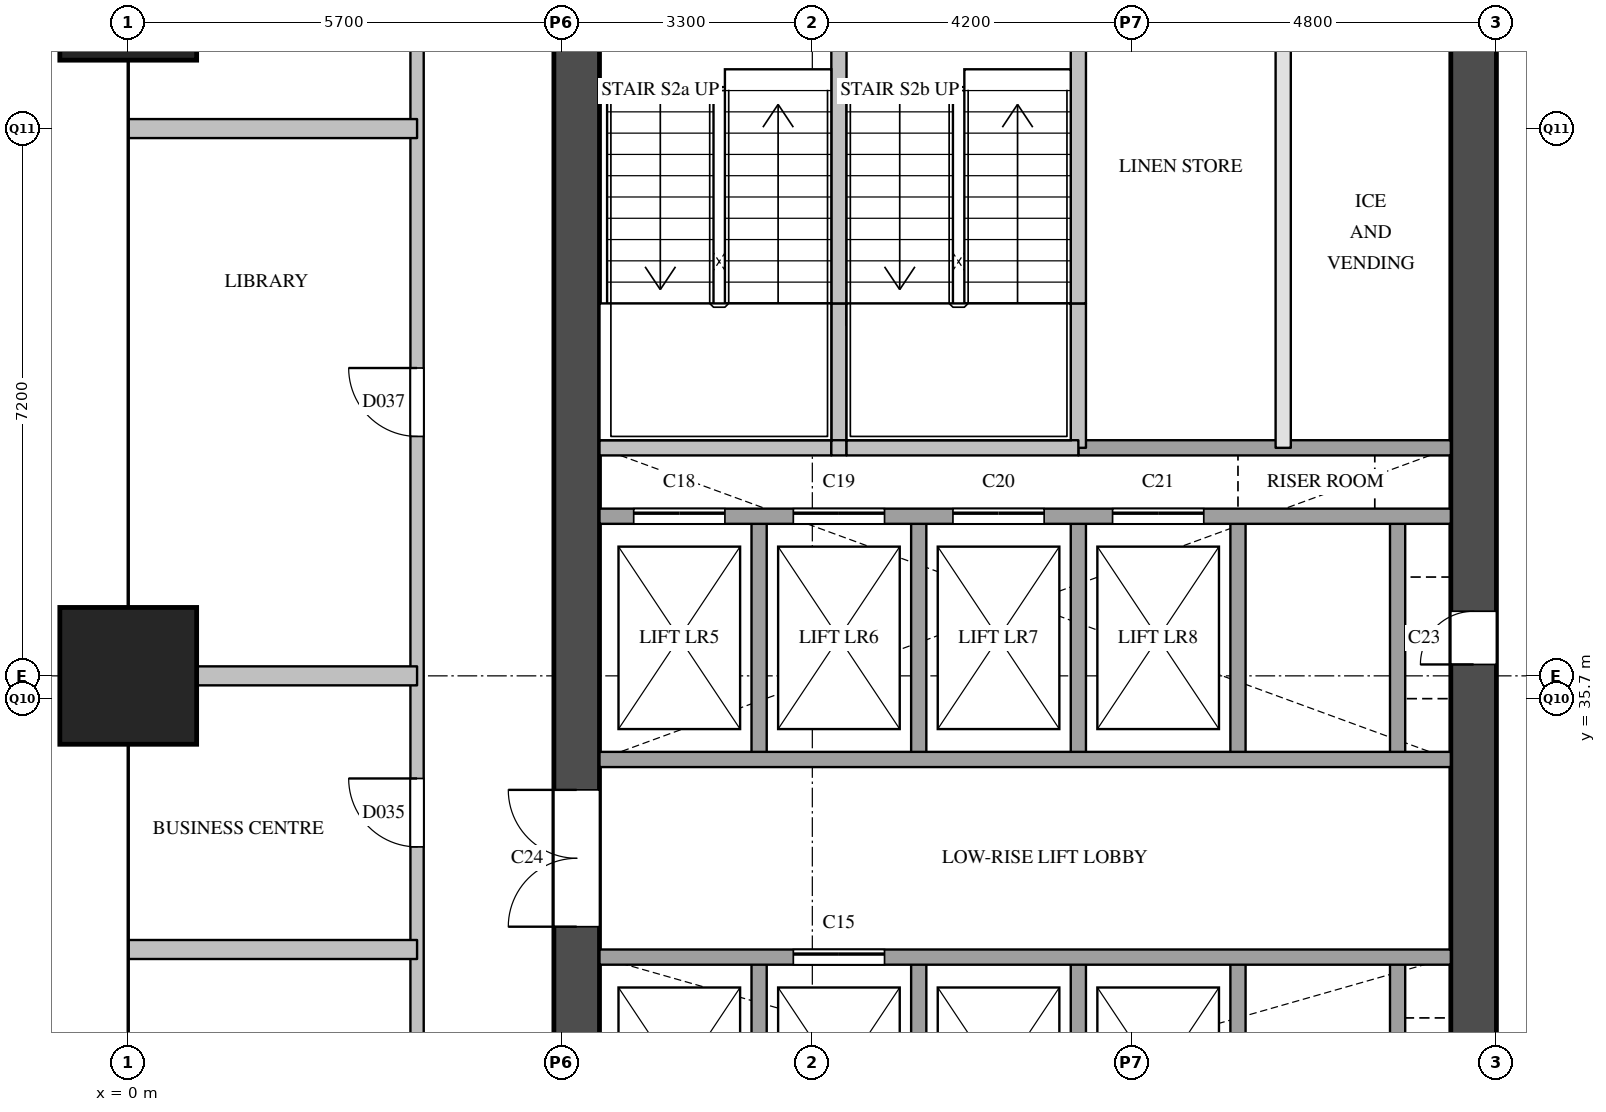
"""IFC4 building model, lengths in metres.
Left out: names, types, materials, properties, quantities, classifications, styles, units other than length and angle.
Written with IfcOpenShell. Run it as: python <this file> out.ifc"""

import sys

from ifc_helpers import new_model, si_unit, direction, frame, frame_2d, origin, origin_2d, place, context, subcontext, project, spatial, rectangle, extrude, element, fill, save


model = new_model("IFC4")
c1 = context("Model", 3, precision=1e-05, world=origin(), true_north=direction((0.0, 1.0)))
c2 = subcontext(c1, "Body", "Model", "MODEL_VIEW")
j1 = project(units=[si_unit("LENGTHUNIT", "METRE"), si_unit("PLANEANGLEUNIT", "RADIAN")], contexts=[c1])
p1 = place(None, origin())
s1 = spatial("IfcSite", under=j1, at=p1, CompositionType="ELEMENT")
p2 = place(p1, origin())
s2 = spatial("IfcBuilding", under=s1, at=p2, CompositionType="ELEMENT")
p3 = place(p2, frame((0.0, 0.0, 57.6)))
s3 = spatial("IfcBuildingStorey", under=s2, at=p3, CompositionType="ELEMENT", Elevation=57.6)
for number, where, z_axis, x_axis in (
    (1, (0.0, 36.0, 0.0), (0.0, 0.0, 1.0), (1.0, 0.0, 0.0)),
    (2, (0.0, 45.0, 0.0), (0.0, 0.0, 1.0), (1.0, 0.0, 0.0)),
):
    element("IfcColumn", number, at=place(p3, frame(where, z_axis=z_axis, x_axis=x_axis)), inside=s3, PredefinedType="COLUMN", context=c2, shape_type="SweptSolid", body=[
        extrude(rectangle(XDim=1.8, YDim=1.8, at=origin_2d()), origin(), (0.0, 0.0, 1.0), 3.8),
    ])
p4 = place(p3, frame((5.9, 29.1, 0.0), z_axis=(0.0, 0.0, 1.0), x_axis=(0.0, 1.0, 0.0)))
e3 = element("IfcWall", 3, at=p4, inside=s3, PredefinedType="SHEAR", context=c2, shape_type="SweptSolid", body=[
    extrude(rectangle(XDim=20.3, YDim=0.6, at=frame_2d((10.15, 0.0))), origin(), (0.0, 0.0, 1.0), 3.5),
])
p5 = place(p4, frame((3.6, 0.0, 0.0)))
e4 = element("IfcOpeningElement", 4, at=p5, cuts=e3, PredefinedType="OPENING", context=c2, shape_type="SweptSolid", body=[
    extrude(rectangle(XDim=1.8, YDim=2.1, at=frame_2d((0.9, 1.05))), frame((0.0, 0.31, 0.0), z_axis=(0.0, -1.0, 0.0), x_axis=(1.0, 0.0, 0.0)), (0.0, 0.0, 1.0), 0.62),
])
p6 = place(p4, frame((16.4, 0.0, 0.0)))
e5 = element("IfcOpeningElement", 5, at=p6, cuts=e3, PredefinedType="OPENING", context=c2, shape_type="SweptSolid", body=[
    extrude(rectangle(XDim=1.0, YDim=2.1, at=frame_2d((0.5, 1.05))), frame((0.0, 0.31, 0.0), z_axis=(0.0, -1.0, 0.0), x_axis=(1.0, 0.0, 0.0)), (0.0, 0.0, 1.0), 0.62),
])
p7 = place(p3, frame((17.7, 29.1, 0.0), z_axis=(0.0, 0.0, 1.0), x_axis=(0.0, 1.0, 0.0)))
e6 = element("IfcWall", 6, at=p7, inside=s3, PredefinedType="SHEAR", context=c2, shape_type="SweptSolid", body=[
    extrude(rectangle(XDim=20.3, YDim=0.6, at=frame_2d((10.15, 0.0))), origin(), (0.0, 0.0, 1.0), 3.5),
])
p8 = place(p7, frame((1.25, 0.0, 0.0)))
e7 = element("IfcOpeningElement", 7, at=p8, cuts=e6, PredefinedType="OPENING", context=c2, shape_type="SweptSolid", body=[
    extrude(rectangle(XDim=0.7, YDim=2.1, at=frame_2d((0.35, 1.05))), frame((0.0, 0.31, 0.0), z_axis=(0.0, -1.0, 0.0), x_axis=(1.0, 0.0, 0.0)), (0.0, 0.0, 1.0), 0.62),
])
p9 = place(p7, frame((7.05, 0.0, 0.0)))
e8 = element("IfcOpeningElement", 8, at=p9, cuts=e6, PredefinedType="OPENING", context=c2, shape_type="SweptSolid", body=[
    extrude(rectangle(XDim=0.7, YDim=2.1, at=frame_2d((0.35, 1.05))), frame((0.0, 0.31, 0.0), z_axis=(0.0, -1.0, 0.0), x_axis=(1.0, 0.0, 0.0)), (0.0, 0.0, 1.0), 0.62),
])
p10 = place(p3, frame((8.3, 29.1, 0.0), z_axis=(0.0, 0.0, 1.0), x_axis=(0.0, 1.0, 0.0)))
e9 = element("IfcWall", 9, at=p10, inside=s3, PredefinedType="SOLIDWALL", context=c2, shape_type="SweptSolid", body=[
    extrude(rectangle(XDim=3.2, YDim=0.2, at=frame_2d((1.6, 0.0))), origin(), (0.0, 0.0, 1.0), 3.5),
])
p11 = place(p3, frame((8.3, 34.9, 0.0), z_axis=(0.0, 0.0, 1.0), x_axis=(0.0, 1.0, 0.0)))
e10 = element("IfcWall", 10, at=p11, inside=s3, PredefinedType="SOLIDWALL", context=c2, shape_type="SweptSolid", body=[
    extrude(rectangle(XDim=3.2, YDim=0.2, at=frame_2d((1.6, 0.0))), origin(), (0.0, 0.0, 1.0), 3.5),
])
p12 = place(p3, frame((9.35, 39.0, 0.0), z_axis=(0.0, 0.0, 1.0), x_axis=(0.0, 1.0, 0.0)))
e11 = element("IfcWall", 11, at=p12, inside=s3, PredefinedType="SOLIDWALL", context=c2, shape_type="SweptSolid", body=[
    extrude(rectangle(XDim=1.9, YDim=0.2, at=frame_2d((0.95, 0.0))), origin(), (0.0, 0.0, 1.0), 3.5),
])
p13 = place(p3, frame((9.35, 40.9, 0.0), z_axis=(0.0, 0.0, 1.0), x_axis=(0.0, 1.0, 0.0)))
e12 = element("IfcWall", 12, at=p13, inside=s3, PredefinedType="SOLIDWALL", context=c2, shape_type="SweptSolid", body=[
    extrude(rectangle(XDim=4.3, YDim=0.2, at=frame_2d((2.15, 0.0))), origin(), (0.0, 0.0, 1.0), 3.5),
])
p14 = place(p3, frame((10.4, 29.1, 0.0), z_axis=(0.0, 0.0, 1.0), x_axis=(0.0, 1.0, 0.0)))
e13 = element("IfcWall", 13, at=p14, inside=s3, PredefinedType="SOLIDWALL", context=c2, shape_type="SweptSolid", body=[
    extrude(rectangle(XDim=3.2, YDim=0.2, at=frame_2d((1.6, 0.0))), origin(), (0.0, 0.0, 1.0), 3.5),
])
p15 = place(p3, frame((10.4, 34.9, 0.0), z_axis=(0.0, 0.0, 1.0), x_axis=(0.0, 1.0, 0.0)))
e14 = element("IfcWall", 14, at=p15, inside=s3, PredefinedType="SOLIDWALL", context=c2, shape_type="SweptSolid", body=[
    extrude(rectangle(XDim=3.2, YDim=0.2, at=frame_2d((1.6, 0.0))), origin(), (0.0, 0.0, 1.0), 3.5),
])
p16 = place(p3, frame((12.5, 29.1, 0.0), z_axis=(0.0, 0.0, 1.0), x_axis=(0.0, 1.0, 0.0)))
e15 = element("IfcWall", 15, at=p16, inside=s3, PredefinedType="SOLIDWALL", context=c2, shape_type="SweptSolid", body=[
    extrude(rectangle(XDim=3.2, YDim=0.2, at=frame_2d((1.6, 0.0))), origin(), (0.0, 0.0, 1.0), 3.5),
])
p17 = place(p3, frame((12.5, 34.9, 0.0), z_axis=(0.0, 0.0, 1.0), x_axis=(0.0, 1.0, 0.0)))
e16 = element("IfcWall", 16, at=p17, inside=s3, PredefinedType="SOLIDWALL", context=c2, shape_type="SweptSolid", body=[
    extrude(rectangle(XDim=3.2, YDim=0.2, at=frame_2d((1.6, 0.0))), origin(), (0.0, 0.0, 1.0), 3.5),
])
p18 = place(p3, frame((12.5, 39.0, 0.0), z_axis=(0.0, 0.0, 1.0), x_axis=(0.0, 1.0, 0.0)))
e17 = element("IfcWall", 17, at=p18, inside=s3, PredefinedType="SOLIDWALL", context=c2, shape_type="SweptSolid", body=[
    extrude(rectangle(XDim=1.9, YDim=0.2, at=frame_2d((0.95, 0.0))), origin(), (0.0, 0.0, 1.0), 3.5),
])
p19 = place(p3, frame((12.5, 40.9, 0.0), z_axis=(0.0, 0.0, 1.0), x_axis=(0.0, 1.0, 0.0)))
e18 = element("IfcWall", 18, at=p19, inside=s3, PredefinedType="SOLIDWALL", context=c2, shape_type="SweptSolid", body=[
    extrude(rectangle(XDim=4.3, YDim=0.2, at=frame_2d((2.15, 0.0))), origin(), (0.0, 0.0, 1.0), 3.5),
])
p20 = place(p3, frame((14.6, 29.1, 0.0), z_axis=(0.0, 0.0, 1.0), x_axis=(0.0, 1.0, 0.0)))
e19 = element("IfcWall", 19, at=p20, inside=s3, PredefinedType="SOLIDWALL", context=c2, shape_type="SweptSolid", body=[
    extrude(rectangle(XDim=3.2, YDim=0.2, at=frame_2d((1.6, 0.0))), origin(), (0.0, 0.0, 1.0), 3.5),
])
p21 = place(p3, frame((14.6, 34.9, 0.0), z_axis=(0.0, 0.0, 1.0), x_axis=(0.0, 1.0, 0.0)))
e20 = element("IfcWall", 20, at=p21, inside=s3, PredefinedType="SOLIDWALL", context=c2, shape_type="SweptSolid", body=[
    extrude(rectangle(XDim=3.2, YDim=0.2, at=frame_2d((1.6, 0.0))), origin(), (0.0, 0.0, 1.0), 3.5),
])
p22 = place(p3, frame((15.195, 39.0, 0.0), z_axis=(0.0, 0.0, 1.0), x_axis=(0.0, 1.0, 0.0)))
e21 = element("IfcWall", 21, at=p22, inside=s3, PredefinedType="PARTITIONING", context=c2, shape_type="SweptSolid", body=[
    extrude(rectangle(XDim=6.2, YDim=0.2, at=frame_2d((3.1, 0.0))), origin(), (0.0, 0.0, 1.0), 3.5),
])
p23 = place(p3, frame((16.7, 29.1, 0.0), z_axis=(0.0, 0.0, 1.0), x_axis=(0.0, 1.0, 0.0)))
e22 = element("IfcWall", 22, at=p23, inside=s3, PredefinedType="SOLIDWALL", context=c2, shape_type="SweptSolid", body=[
    extrude(rectangle(XDim=3.2, YDim=0.2, at=frame_2d((1.6, 0.0))), origin(), (0.0, 0.0, 1.0), 3.5),
])
p24 = place(p3, frame((16.7, 34.9, 0.0), z_axis=(0.0, 0.0, 1.0), x_axis=(0.0, 1.0, 0.0)))
e23 = element("IfcWall", 23, at=p24, inside=s3, PredefinedType="SOLIDWALL", context=c2, shape_type="SweptSolid", body=[
    extrude(rectangle(XDim=3.2, YDim=0.2, at=frame_2d((1.6, 0.0))), origin(), (0.0, 0.0, 1.0), 3.5),
])
p25 = place(p3, frame((6.2, 32.3, 0.0), z_axis=(0.0, 0.0, 1.0), x_axis=(1.0, 0.0, 0.0)))
e24 = element("IfcWall", 24, at=p25, inside=s3, PredefinedType="SOLIDWALL", context=c2, shape_type="SweptSolid", body=[
    extrude(rectangle(XDim=11.2, YDim=0.2, at=frame_2d((5.6, 0.0))), origin(), (0.0, 0.0, 1.0), 3.5),
])
p26 = place(p25, frame((2.55, 0.0, 0.0)))
e25 = element("IfcOpeningElement", 25, at=p26, cuts=e24, PredefinedType="OPENING", context=c2, shape_type="SweptSolid", body=[
    extrude(rectangle(XDim=1.2, YDim=2.1, at=frame_2d((0.6, 1.05))), frame((0.0, 0.11, 0.0), z_axis=(0.0, -1.0, 0.0), x_axis=(1.0, 0.0, 0.0)), (0.0, 0.0, 1.0), 0.22),
])
p27 = place(p3, frame((6.2, 34.9, 0.0), z_axis=(0.0, 0.0, 1.0), x_axis=(1.0, 0.0, 0.0)))
e26 = element("IfcWall", 26, at=p27, inside=s3, PredefinedType="SOLIDWALL", context=c2, shape_type="SweptSolid", body=[
    extrude(rectangle(XDim=11.2, YDim=0.2, at=frame_2d((5.6, 0.0))), origin(), (0.0, 0.0, 1.0), 3.5),
])
p28 = place(p3, frame((6.2, 38.1, 0.0), z_axis=(0.0, 0.0, 1.0), x_axis=(1.0, 0.0, 0.0)))
e27 = element("IfcWall", 27, at=p28, inside=s3, PredefinedType="SOLIDWALL", context=c2, shape_type="SweptSolid", body=[
    extrude(rectangle(XDim=11.2, YDim=0.2, at=frame_2d((5.6, 0.0))), origin(), (0.0, 0.0, 1.0), 3.5),
])
p29 = place(p28, frame((0.45, 0.0, 0.0)))
e28 = element("IfcOpeningElement", 28, at=p29, cuts=e27, PredefinedType="OPENING", context=c2, shape_type="SweptSolid", body=[
    extrude(rectangle(XDim=1.2, YDim=2.1, at=frame_2d((0.6, 1.05))), frame((0.0, 0.11, 0.0), z_axis=(0.0, -1.0, 0.0), x_axis=(1.0, 0.0, 0.0)), (0.0, 0.0, 1.0), 0.22),
])
p30 = place(p28, frame((2.55, 0.0, 0.0)))
e29 = element("IfcOpeningElement", 29, at=p30, cuts=e27, PredefinedType="OPENING", context=c2, shape_type="SweptSolid", body=[
    extrude(rectangle(XDim=1.2, YDim=2.1, at=frame_2d((0.6, 1.05))), frame((0.0, 0.11, 0.0), z_axis=(0.0, -1.0, 0.0), x_axis=(1.0, 0.0, 0.0)), (0.0, 0.0, 1.0), 0.22),
])
p31 = place(p28, frame((4.65, 0.0, 0.0)))
e30 = element("IfcOpeningElement", 30, at=p31, cuts=e27, PredefinedType="OPENING", context=c2, shape_type="SweptSolid", body=[
    extrude(rectangle(XDim=1.2, YDim=2.1, at=frame_2d((0.6, 1.05))), frame((0.0, 0.11, 0.0), z_axis=(0.0, -1.0, 0.0), x_axis=(1.0, 0.0, 0.0)), (0.0, 0.0, 1.0), 0.22),
])
p32 = place(p28, frame((6.75, 0.0, 0.0)))
e31 = element("IfcOpeningElement", 31, at=p32, cuts=e27, PredefinedType="OPENING", context=c2, shape_type="SweptSolid", body=[
    extrude(rectangle(XDim=1.2, YDim=2.1, at=frame_2d((0.6, 1.05))), frame((0.0, 0.11, 0.0), z_axis=(0.0, -1.0, 0.0), x_axis=(1.0, 0.0, 0.0)), (0.0, 0.0, 1.0), 0.22),
])
p33 = place(p3, frame((12.5, 39.0, 0.0), z_axis=(0.0, 0.0, 1.0), x_axis=(1.0, 0.0, 0.0)))
e32 = element("IfcWall", 32, at=p33, inside=s3, PredefinedType="SOLIDWALL", context=c2, shape_type="SweptSolid", body=[
    extrude(rectangle(XDim=4.9, YDim=0.2, at=frame_2d((2.45, 0.0))), origin(), (0.0, 0.0, 1.0), 3.5),
])
p34 = place(p3, frame((6.2, 39.0, 0.0), z_axis=(0.0, 0.0, 1.0), x_axis=(1.0, 0.0, 0.0)))
e33 = element("IfcWall", 33, at=p34, inside=s3, PredefinedType="SOLIDWALL", context=c2, shape_type="SweptSolid", body=[
    extrude(rectangle(XDim=3.05, YDim=0.2, at=frame_2d((1.525, 0.0))), origin(), (0.0, 0.0, 1.0), 3.5),
])
p35 = place(p3, frame((9.25, 39.0, 0.0), z_axis=(0.0, 0.0, 1.0), x_axis=(1.0, 0.0, 0.0)))
e34 = element("IfcWall", 34, at=p35, inside=s3, PredefinedType="SOLIDWALL", context=c2, shape_type="SweptSolid", body=[
    extrude(rectangle(XDim=0.2, YDim=0.2, at=frame_2d((0.1, 0.0))), origin(), (0.0, 0.0, 1.0), 3.5),
])
p36 = place(p3, frame((9.45, 39.0, 0.0), z_axis=(0.0, 0.0, 1.0), x_axis=(1.0, 0.0, 0.0)))
e35 = element("IfcWall", 35, at=p36, inside=s3, PredefinedType="SOLIDWALL", context=c2, shape_type="SweptSolid", body=[
    extrude(rectangle(XDim=3.05, YDim=0.2, at=frame_2d((1.525, 0.0))), origin(), (0.0, 0.0, 1.0), 3.5),
])
p37 = place(p3, frame((3.8, 26.7, 0.0), z_axis=(0.0, 0.0, 1.0), x_axis=(0.0, 1.0, 0.0)))
e36 = element("IfcWall", 36, at=p37, inside=s3, PredefinedType="PARTITIONING", context=c2, shape_type="SweptSolid", body=[
    extrude(rectangle(XDim=25.1, YDim=0.175, at=frame_2d((12.55, 0.0))), origin(), (0.0, 0.0, 1.0), 2.5),
])
p38 = place(p37, frame((2.4, 0.0, 0.0)))
e37 = element("IfcOpeningElement", 37, at=p38, cuts=e36, PredefinedType="OPENING", context=c2, shape_type="SweptSolid", body=[
    extrude(rectangle(XDim=0.9, YDim=2.1, at=frame_2d((0.45, 1.05))), frame((0.0, 0.097, 0.0), z_axis=(0.0, -1.0, 0.0), x_axis=(1.0, 0.0, 0.0)), (0.0, 0.0, 1.0), 0.195),
])
p39 = place(p37, frame((7.05, 0.0, 0.0)))
e38 = element("IfcOpeningElement", 38, at=p39, cuts=e36, PredefinedType="OPENING", context=c2, shape_type="SweptSolid", body=[
    extrude(rectangle(XDim=0.9, YDim=2.1, at=frame_2d((0.45, 1.05))), frame((0.0, 0.097, 0.0), z_axis=(0.0, -1.0, 0.0), x_axis=(1.0, 0.0, 0.0)), (0.0, 0.0, 1.0), 0.195),
])
p40 = place(p37, frame((12.45, 0.0, 0.0)))
e39 = element("IfcOpeningElement", 39, at=p40, cuts=e36, PredefinedType="OPENING", context=c2, shape_type="SweptSolid", body=[
    extrude(rectangle(XDim=0.9, YDim=2.1, at=frame_2d((0.45, 1.05))), frame((0.0, 0.097, 0.0), z_axis=(0.0, -1.0, 0.0), x_axis=(1.0, 0.0, 0.0)), (0.0, 0.0, 1.0), 0.195),
])
p41 = place(p37, frame((20.35, 0.0, 0.0)))
e40 = element("IfcOpeningElement", 40, at=p41, cuts=e36, PredefinedType="OPENING", context=c2, shape_type="SweptSolid", body=[
    extrude(rectangle(XDim=0.9, YDim=2.1, at=frame_2d((0.45, 1.05))), frame((0.0, 0.097, 0.0), z_axis=(0.0, -1.0, 0.0), x_axis=(1.0, 0.0, 0.0)), (0.0, 0.0, 1.0), 0.195),
])
p42 = place(p3, frame((0.0, 32.4, 0.0), z_axis=(0.0, 0.0, 1.0), x_axis=(1.0, 0.0, 0.0)))
e41 = element("IfcWall", 41, at=p42, inside=s3, PredefinedType="PARTITIONING", context=c2, shape_type="SweptSolid", body=[
    extrude(rectangle(XDim=3.8, YDim=0.25, at=frame_2d((1.9, 0.0))), origin(), (0.0, 0.0, 1.0), 2.5),
])
p43 = place(p3, frame((0.0, 36.0, 0.0), z_axis=(0.0, 0.0, 1.0), x_axis=(1.0, 0.0, 0.0)))
e42 = element("IfcWall", 42, at=p43, inside=s3, PredefinedType="PARTITIONING", context=c2, shape_type="SweptSolid", body=[
    extrude(rectangle(XDim=3.8, YDim=0.25, at=frame_2d((1.9, 0.0))), origin(), (0.0, 0.0, 1.0), 3.5),
])
p44 = place(p3, frame((0.0, 43.2, 0.0), z_axis=(0.0, 0.0, 1.0), x_axis=(1.0, 0.0, 0.0)))
e43 = element("IfcWall", 43, at=p44, inside=s3, PredefinedType="PARTITIONING", context=c2, shape_type="SweptSolid", body=[
    extrude(rectangle(XDim=3.8, YDim=0.25, at=frame_2d((1.9, 0.0))), origin(), (0.0, 0.0, 1.0), 2.5),
])
p45 = place(p26, origin())
e44 = element("IfcDoor", 44, at=p45, inside=s3, OperationType="SLIDING_TO_LEFT", PredefinedType="DOOR", context=c2, shape_type="SweptSolid", body=[
    extrude(rectangle(XDim=1.2, YDim=2.1, at=frame_2d((0.6, 1.05))), frame((0.0, 0.025, 0.0), z_axis=(0.0, -1.0, 0.0), x_axis=(1.0, 0.0, 0.0)), (0.0, 0.0, 1.0), 0.05),
])
fill(e25, e44)
p46 = place(p29, origin())
e45 = element("IfcDoor", 45, at=p46, inside=s3, OperationType="SLIDING_TO_LEFT", PredefinedType="DOOR", context=c2, shape_type="SweptSolid", body=[
    extrude(rectangle(XDim=1.2, YDim=2.1, at=frame_2d((0.6, 1.05))), frame((0.0, 0.025, 0.0), z_axis=(0.0, -1.0, 0.0), x_axis=(1.0, 0.0, 0.0)), (0.0, 0.0, 1.0), 0.05),
])
fill(e28, e45)
p47 = place(p30, origin())
e46 = element("IfcDoor", 46, at=p47, inside=s3, OperationType="SLIDING_TO_LEFT", PredefinedType="DOOR", context=c2, shape_type="SweptSolid", body=[
    extrude(rectangle(XDim=1.2, YDim=2.1, at=frame_2d((0.6, 1.05))), frame((0.0, 0.025, 0.0), z_axis=(0.0, -1.0, 0.0), x_axis=(1.0, 0.0, 0.0)), (0.0, 0.0, 1.0), 0.05),
])
fill(e29, e46)
p48 = place(p31, origin())
e47 = element("IfcDoor", 47, at=p48, inside=s3, OperationType="SLIDING_TO_LEFT", PredefinedType="DOOR", context=c2, shape_type="SweptSolid", body=[
    extrude(rectangle(XDim=1.2, YDim=2.1, at=frame_2d((0.6, 1.05))), frame((0.0, 0.025, 0.0), z_axis=(0.0, -1.0, 0.0), x_axis=(1.0, 0.0, 0.0)), (0.0, 0.0, 1.0), 0.05),
])
fill(e30, e47)
p49 = place(p32, origin())
e48 = element("IfcDoor", 48, at=p49, inside=s3, OperationType="SLIDING_TO_LEFT", PredefinedType="DOOR", context=c2, shape_type="SweptSolid", body=[
    extrude(rectangle(XDim=1.2, YDim=2.1, at=frame_2d((0.6, 1.05))), frame((0.0, 0.025, 0.0), z_axis=(0.0, -1.0, 0.0), x_axis=(1.0, 0.0, 0.0)), (0.0, 0.0, 1.0), 0.05),
])
fill(e31, e48)
p50 = place(p9, origin())
e49 = element("IfcDoor", 49, at=p50, inside=s3, OperationType="SINGLE_SWING_LEFT", PredefinedType="DOOR", context=c2, shape_type="SweptSolid", body=[
    extrude(rectangle(XDim=0.7, YDim=2.1, at=frame_2d((0.35, 1.05))), frame((0.0, 0.025, 0.0), z_axis=(0.0, -1.0, 0.0), x_axis=(1.0, 0.0, 0.0)), (0.0, 0.0, 1.0), 0.05),
])
fill(e8, e49)
p51 = place(p5, origin())
e50 = element("IfcDoor", 50, at=p51, inside=s3, OperationType="DOUBLE_DOOR_SINGLE_SWING", PredefinedType="DOOR", context=c2, shape_type="SweptSolid", body=[
    extrude(rectangle(XDim=1.8, YDim=2.1, at=frame_2d((0.9, 1.05))), frame((0.0, 0.025, 0.0), z_axis=(0.0, -1.0, 0.0), x_axis=(1.0, 0.0, 0.0)), (0.0, 0.0, 1.0), 0.05),
])
fill(e4, e50)
p52 = place(p39, origin())
e51 = element("IfcDoor", 51, at=p52, inside=s3, OperationType="SINGLE_SWING_RIGHT", PredefinedType="DOOR", context=c2, shape_type="SweptSolid", body=[
    extrude(rectangle(XDim=0.9, YDim=2.1, at=frame_2d((0.45, 1.05))), frame((0.0, 0.025, 0.0), z_axis=(0.0, -1.0, 0.0), x_axis=(1.0, 0.0, 0.0)), (0.0, 0.0, 1.0), 0.05),
])
fill(e38, e51)
p53 = place(p40, origin())
e52 = element("IfcDoor", 52, at=p53, inside=s3, OperationType="SINGLE_SWING_RIGHT", PredefinedType="DOOR", context=c2, shape_type="SweptSolid", body=[
    extrude(rectangle(XDim=0.9, YDim=2.1, at=frame_2d((0.45, 1.05))), frame((0.0, 0.025, 0.0), z_axis=(0.0, -1.0, 0.0), x_axis=(1.0, 0.0, 0.0)), (0.0, 0.0, 1.0), 0.05),
])
fill(e39, e52)
save(model, sys.argv[1])
